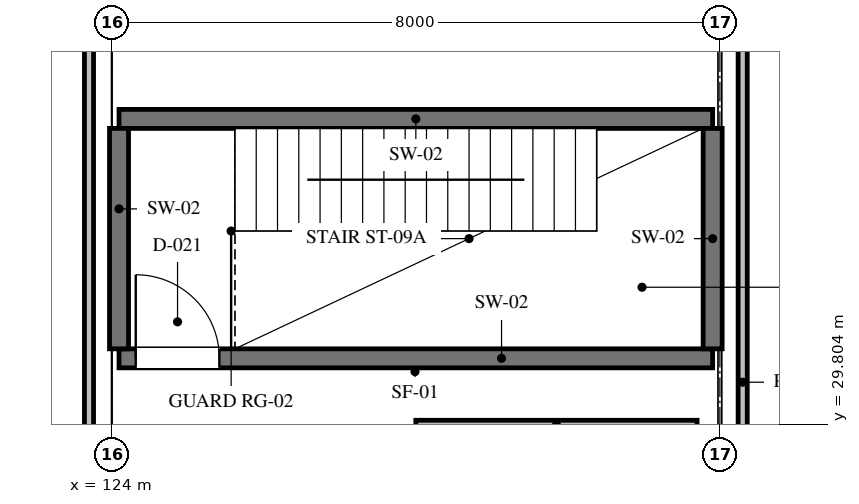
"""IFC4 building model, lengths in metres.
Left out: names, types, materials, properties, quantities, classifications, styles, units other than length and angle.
Written with IfcOpenShell. Run it as: python <this file> out.ifc"""

import sys

from ifc_helpers import new_model, si_unit, direction, frame, frame_2d, origin, place, context, subcontext, project, spatial, rectangle, extrude, element, fill, save


model = new_model("IFC4")
c1 = context("Model", 3, precision=1e-05, world=origin(), true_north=direction((0.0, 1.0)))
c2 = subcontext(c1, "Body", "Model", "MODEL_VIEW")
j1 = project(units=[si_unit("LENGTHUNIT", "METRE"), si_unit("PLANEANGLEUNIT", "RADIAN")], contexts=[c1])
p1 = place(None, origin())
s1 = spatial("IfcSite", under=j1, at=p1, CompositionType="ELEMENT")
p2 = place(p1, origin())
s2 = spatial("IfcBuilding", under=s1, at=p2, CompositionType="ELEMENT")
p3 = place(p2, frame((0.0, 0.0, 5.85)))
s3 = spatial("IfcBuildingStorey", under=s2, at=p3, CompositionType="ELEMENT", Elevation=5.85)
p4 = place(p3, frame((124.095, 30.675, 0.0), z_axis=(0.0, 0.0, 1.0), x_axis=(1.0, 0.0, 0.0)))
e1 = element("IfcWall", 1, at=p4, inside=s3, PredefinedType="SHEAR", context=c2, shape_type="SweptSolid", body=[
    extrude(rectangle(XDim=7.81, YDim=0.25, at=frame_2d((3.905, 0.0))), origin(), (0.0, 0.0, 1.0), 4.0),
])
p5 = place(p4, frame((0.22, 0.0, 0.0)))
e2 = element("IfcOpeningElement", 2, at=p5, cuts=e1, PredefinedType="OPENING", context=c2, shape_type="SweptSolid", body=[
    extrude(rectangle(XDim=1.1, YDim=2.15, at=frame_2d((0.55, 1.075))), frame((0.0, 0.135, 0.0), z_axis=(0.0, -1.0, 0.0), x_axis=(1.0, 0.0, 0.0)), (0.0, 0.0, 1.0), 0.27),
])
p6 = place(p3, frame((124.095, 33.825, 0.0), z_axis=(0.0, 0.0, 1.0), x_axis=(1.0, 0.0, 0.0)))
e3 = element("IfcWall", 3, at=p6, inside=s3, PredefinedType="SHEAR", context=c2, shape_type="SweptSolid", body=[
    extrude(rectangle(XDim=7.81, YDim=0.25, at=frame_2d((3.905, 0.0))), origin(), (0.0, 0.0, 1.0), 4.0),
])
p7 = place(p3, frame((124.095, 30.8, 0.0), z_axis=(0.0, 0.0, 1.0), x_axis=(0.0, 1.0, 0.0)))
e4 = element("IfcWall", 4, at=p7, inside=s3, PredefinedType="SHEAR", context=c2, shape_type="SweptSolid", body=[
    extrude(rectangle(XDim=2.9, YDim=0.25, at=frame_2d((1.45, 0.0))), origin(), (0.0, 0.0, 1.0), 4.0),
])
p8 = place(p3, frame((131.905, 30.8, 0.0), z_axis=(0.0, 0.0, 1.0), x_axis=(0.0, 1.0, 0.0)))
e5 = element("IfcWall", 5, at=p8, inside=s3, PredefinedType="SHEAR", context=c2, shape_type="SweptSolid", body=[
    extrude(rectangle(XDim=2.9, YDim=0.25, at=frame_2d((1.45, 0.0))), origin(), (0.0, 0.0, 1.0), 3.96),
])
p9 = place(p3, frame((123.7, 24.263, 0.0), z_axis=(0.0, 0.0, 1.0), x_axis=(0.0, 1.0, 0.0)))
e6 = element("IfcWall", 6, at=p9, inside=s3, PredefinedType="PARTITIONING", context=c2, shape_type="SweptSolid", body=[
    extrude(rectangle(XDim=10.959, YDim=0.12, at=frame_2d((5.479, 0.0))), origin(), (0.0, 0.0, 1.0), 3.594),
])
p10 = place(p3, frame((128.0, 29.8, 0.0), z_axis=(0.0, 0.0, 1.0), x_axis=(1.0, 0.0, 0.0)))
e7 = element("IfcWall", 7, at=p10, inside=s3, PredefinedType="PARTITIONING", context=c2, shape_type="SweptSolid", body=[
    extrude(rectangle(XDim=3.7, YDim=0.12, at=frame_2d((1.85, 0.0))), origin(), (0.0, 0.0, 1.0), 4.0),
])
p11 = place(p3, frame((132.3, 24.263, 0.0), z_axis=(0.0, 0.0, 1.0), x_axis=(0.0, 1.0, 0.0)))
e8 = element("IfcWall", 8, at=p11, inside=s3, PredefinedType="PARTITIONING", context=c2, shape_type="SweptSolid", body=[
    extrude(rectangle(XDim=10.959, YDim=0.12, at=frame_2d((5.479, 0.0))), origin(), (0.0, 0.0, 1.0), 3.594),
])
p12 = place(p5, frame((1.1, 0.0, 0.0), z_axis=(0.0, 0.0, 1.0), x_axis=(-1.0, 0.0, 0.0)))
e9 = element("IfcDoor", 9, at=p12, inside=s3, OperationType="SINGLE_SWING_LEFT", PredefinedType="DOOR", context=c2, shape_type="SweptSolid", body=[
    extrude(rectangle(XDim=1.1, YDim=2.15, at=frame_2d((0.55, 1.075))), frame((0.0, 0.025, 0.0), z_axis=(0.0, -1.0, 0.0), x_axis=(1.0, 0.0, 0.0)), (0.0, 0.0, 1.0), 0.05),
])
fill(e2, e9)
save(model, sys.argv[1])
